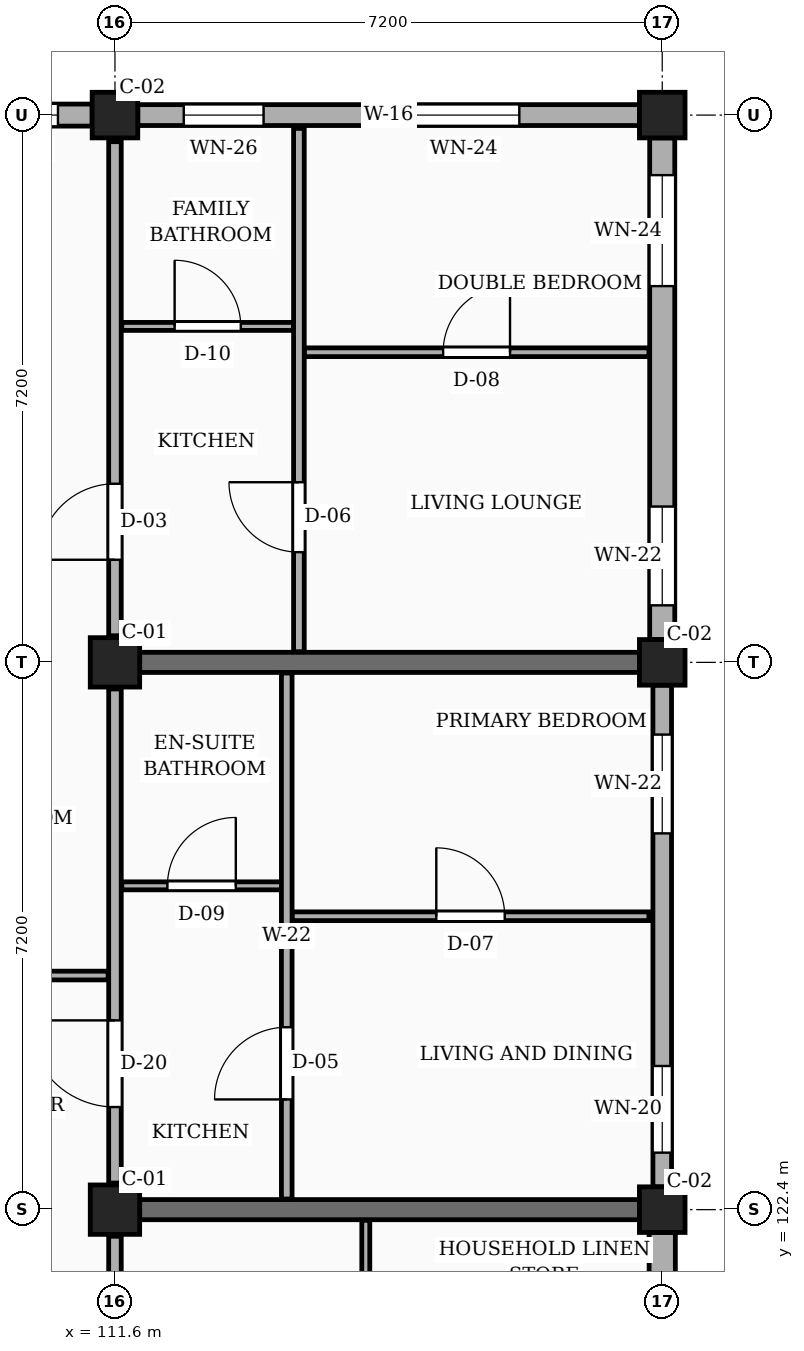
"""IFC4 building model, lengths in metres.
Left out: names, types, materials, properties, quantities, classifications, styles, units other than length and angle.
Written with IfcOpenShell. Run it as: python <this file> out.ifc"""

import sys

from ifc_helpers import new_model, si_unit, direction, frame, frame_2d, origin, origin_2d, place, context, subcontext, project, spatial, rectangle, extrude, element, fill, save


model = new_model("IFC4")
c1 = context("Model", 3, precision=1e-05, world=origin(), true_north=direction((0.0, 1.0)))
c2 = subcontext(c1, "Body", "Model", "MODEL_VIEW")
j1 = project(units=[si_unit("LENGTHUNIT", "METRE"), si_unit("PLANEANGLEUNIT", "RADIAN")], contexts=[c1])
p1 = place(None, origin())
s1 = spatial("IfcSite", under=j1, at=p1, CompositionType="ELEMENT")
p2 = place(p1, origin())
s2 = spatial("IfcBuilding", under=s1, at=p2, CompositionType="ELEMENT")
p3 = place(p2, frame((0.0, 0.0, 4.5)))
s3 = spatial("IfcBuildingStorey", under=s2, at=p3, CompositionType="ELEMENT", Elevation=4.5)
for number, where, z_axis, x_axis in (
    (1, (111.6, 122.4, 0.0), (0.0, 0.0, 1.0), (1.0, 0.0, 0.0)),
    (2, (111.6, 129.6, 0.0), (0.0, 0.0, 1.0), (1.0, 0.0, 0.0)),
):
    element("IfcColumn", number, at=place(p3, frame(where, z_axis=z_axis, x_axis=x_axis)), inside=s3, PredefinedType="COLUMN", context=c2, shape_type="SweptSolid", body=[
        extrude(rectangle(XDim=0.65, YDim=0.65, at=origin_2d()), origin(), (0.0, 0.0, 1.0), 3.15),
    ])
for number, where, z_axis, x_axis in (
    (3, (111.6, 136.8, 0.0), (0.0, 0.0, 1.0), (1.0, 0.0, 0.0)),
    (4, (118.8, 122.4, 0.0), (0.0, 0.0, 1.0), (1.0, 0.0, 0.0)),
    (5, (118.8, 129.6, 0.0), (0.0, 0.0, 1.0), (1.0, 0.0, 0.0)),
    (6, (118.8, 136.8, 0.0), (0.0, 0.0, 1.0), (1.0, 0.0, 0.0)),
):
    element("IfcColumn", number, at=place(p3, frame(where, z_axis=z_axis, x_axis=x_axis)), inside=s3, PredefinedType="COLUMN", context=c2, shape_type="SweptSolid", body=[
        extrude(rectangle(XDim=0.6, YDim=0.6, at=origin_2d()), origin(), (0.0, 0.0, 1.0), 3.15),
    ])
for number, where, z_axis, x_axis in (
    (7, (111.925, 122.4, 0.0), (0.0, 0.0, 1.0), (1.0, 0.0, 0.0)),
    (8, (111.925, 129.6, 0.0), (0.0, 0.0, 1.0), (1.0, 0.0, 0.0)),
):
    element("IfcWall", number, at=place(p3, frame(where, z_axis=z_axis, x_axis=x_axis)), inside=s3, PredefinedType="SOLIDWALL", context=c2, shape_type="SweptSolid", body=[
        extrude(rectangle(XDim=6.575, YDim=0.265, at=frame_2d((3.288, 0.0))), origin(), (0.0, 0.0, 1.0), 2.19),
    ])
p4 = place(p3, frame((118.8, 115.5, 0.0), z_axis=(0.0, 0.0, 1.0), x_axis=(0.0, 1.0, 0.0)))
e9 = element("IfcWall", 9, at=p4, inside=s3, PredefinedType="SOLIDWALL", context=c2, shape_type="SweptSolid", body=[
    extrude(rectangle(XDim=6.6, YDim=0.345, at=frame_2d((3.3, 0.0))), origin(), (0.0, 0.0, 1.0), 2.46),
])
p5 = place(p4, frame((0.45, 0.0, 0.78)))
e10 = element("IfcOpeningElement", 10, at=p5, cuts=e9, PredefinedType="OPENING", context=c2, shape_type="SweptSolid", body=[
    extrude(rectangle(XDim=0.98, YDim=1.36, at=frame_2d((0.49, 0.68))), frame((0.0, 0.183, 0.0), z_axis=(0.0, -1.0, 0.0), x_axis=(1.0, 0.0, 0.0)), (0.0, 0.0, 1.0), 0.365),
])
p6 = place(p4, frame((4.65, 0.0, 0.78)))
e11 = element("IfcOpeningElement", 11, at=p6, cuts=e9, PredefinedType="OPENING", context=c2, shape_type="SweptSolid", body=[
    extrude(rectangle(XDim=1.14, YDim=1.36, at=frame_2d((0.57, 0.68))), frame((0.0, 0.183, 0.0), z_axis=(0.0, -1.0, 0.0), x_axis=(1.0, 0.0, 0.0)), (0.0, 0.0, 1.0), 0.365),
])
p7 = place(p3, frame((118.8, 122.7, 0.0), z_axis=(0.0, 0.0, 1.0), x_axis=(0.0, 1.0, 0.0)))
e12 = element("IfcWall", 12, at=p7, inside=s3, PredefinedType="SOLIDWALL", context=c2, shape_type="SweptSolid", body=[
    extrude(rectangle(XDim=6.6, YDim=0.245, at=frame_2d((3.3, 0.0))), origin(), (0.0, 0.0, 1.0), 2.46),
])
p8 = place(p7, frame((0.45, 0.0, 0.78)))
e13 = element("IfcOpeningElement", 13, at=p8, cuts=e12, PredefinedType="OPENING", context=c2, shape_type="SweptSolid", body=[
    extrude(rectangle(XDim=1.14, YDim=1.36, at=frame_2d((0.57, 0.68))), frame((0.0, 0.133, 0.0), z_axis=(0.0, -1.0, 0.0), x_axis=(1.0, 0.0, 0.0)), (0.0, 0.0, 1.0), 0.265),
])
p9 = place(p7, frame((4.65, 0.0, 0.78)))
e14 = element("IfcOpeningElement", 14, at=p9, cuts=e12, PredefinedType="OPENING", context=c2, shape_type="SweptSolid", body=[
    extrude(rectangle(XDim=1.3, YDim=1.36, at=frame_2d((0.65, 0.68))), frame((0.0, 0.133, 0.0), z_axis=(0.0, -1.0, 0.0), x_axis=(1.0, 0.0, 0.0)), (0.0, 0.0, 1.0), 0.265),
])
p10 = place(p3, frame((118.8, 129.9, 0.0), z_axis=(0.0, 0.0, 1.0), x_axis=(0.0, 1.0, 0.0)))
e15 = element("IfcWall", 15, at=p10, inside=s3, PredefinedType="SOLIDWALL", context=c2, shape_type="SweptSolid", body=[
    extrude(rectangle(XDim=6.6, YDim=0.33, at=frame_2d((3.3, 0.0))), origin(), (0.0, 0.0, 1.0), 2.46),
])
p11 = place(p10, frame((0.45, 0.0, 0.78)))
e16 = element("IfcOpeningElement", 16, at=p11, cuts=e15, PredefinedType="OPENING", context=c2, shape_type="SweptSolid", body=[
    extrude(rectangle(XDim=1.3, YDim=1.36, at=frame_2d((0.65, 0.68))), frame((0.0, 0.175, 0.0), z_axis=(0.0, -1.0, 0.0), x_axis=(1.0, 0.0, 0.0)), (0.0, 0.0, 1.0), 0.35),
])
p12 = place(p10, frame((4.65, 0.0, 0.78)))
e17 = element("IfcOpeningElement", 17, at=p12, cuts=e15, PredefinedType="OPENING", context=c2, shape_type="SweptSolid", body=[
    extrude(rectangle(XDim=1.46, YDim=1.36, at=frame_2d((0.73, 0.68))), frame((0.0, 0.175, 0.0), z_axis=(0.0, -1.0, 0.0), x_axis=(1.0, 0.0, 0.0)), (0.0, 0.0, 1.0), 0.35),
])
p13 = place(p3, frame((118.5, 136.8, 0.0), z_axis=(0.0, 0.0, 1.0), x_axis=(-1.0, 0.0, 0.0)))
e18 = element("IfcWall", 18, at=p13, inside=s3, PredefinedType="SOLIDWALL", context=c2, shape_type="SweptSolid", body=[
    extrude(rectangle(XDim=6.6, YDim=0.275, at=frame_2d((3.3, 0.0))), origin(), (0.0, 0.0, 1.0), 2.46),
])
p14 = place(p13, frame((1.58, 0.0, 0.78)))
e19 = element("IfcOpeningElement", 19, at=p14, cuts=e18, PredefinedType="OPENING", context=c2, shape_type="SweptSolid", body=[
    extrude(rectangle(XDim=1.46, YDim=1.36, at=frame_2d((0.73, 0.68))), frame((0.0, 0.147, 0.0), z_axis=(0.0, -1.0, 0.0), x_axis=(1.0, 0.0, 0.0)), (0.0, 0.0, 1.0), 0.295),
])
p15 = place(p13, frame((4.945, 0.0, 0.78)))
e20 = element("IfcOpeningElement", 20, at=p15, cuts=e18, PredefinedType="OPENING", context=c2, shape_type="SweptSolid", body=[
    extrude(rectangle(XDim=1.05, YDim=1.44, at=frame_2d((0.525, 0.72))), frame((0.0, 0.147, 0.0), z_axis=(0.0, -1.0, 0.0), x_axis=(1.0, 0.0, 0.0)), (0.0, 0.0, 1.0), 0.295),
])
p16 = place(p3, frame((111.3, 136.8, 0.0), z_axis=(0.0, 0.0, 1.0), x_axis=(-1.0, 0.0, 0.0)))
e21 = element("IfcWall", 21, at=p16, inside=s3, PredefinedType="SOLIDWALL", context=c2, shape_type="SweptSolid", body=[
    extrude(rectangle(XDim=6.6, YDim=0.29, at=frame_2d((3.3, 0.0))), origin(), (0.0, 0.0, 1.0), 2.46),
])
p17 = place(p16, frame((0.45, 0.0, 0.78)))
e22 = element("IfcOpeningElement", 22, at=p17, cuts=e21, PredefinedType="OPENING", context=c2, shape_type="SweptSolid", body=[
    extrude(rectangle(XDim=1.05, YDim=1.44, at=frame_2d((0.525, 0.72))), frame((0.0, 0.155, 0.0), z_axis=(0.0, -1.0, 0.0), x_axis=(1.0, 0.0, 0.0)), (0.0, 0.0, 1.0), 0.31),
])
p18 = place(p16, frame((4.65, 0.0, 0.78)))
e23 = element("IfcOpeningElement", 23, at=p18, cuts=e21, PredefinedType="OPENING", context=c2, shape_type="SweptSolid", body=[
    extrude(rectangle(XDim=1.25, YDim=1.44, at=frame_2d((0.625, 0.72))), frame((0.0, 0.155, 0.0), z_axis=(0.0, -1.0, 0.0), x_axis=(1.0, 0.0, 0.0)), (0.0, 0.0, 1.0), 0.31),
])
p19 = place(p3, frame((111.6, 115.55, 0.0), z_axis=(0.0, 0.0, 1.0), x_axis=(0.0, 1.0, 0.0)))
e24 = element("IfcWall", 24, at=p19, inside=s3, PredefinedType="PARTITIONING", context=c2, shape_type="SweptSolid", body=[
    extrude(rectangle(XDim=6.5, YDim=0.165, at=frame_2d((3.25, 0.0))), origin(), (0.0, 0.0, 1.0), 2.24),
])
p20 = place(p19, frame((1.1, 0.0, 0.0)))
e25 = element("IfcOpeningElement", 25, at=p20, cuts=e24, PredefinedType="OPENING", context=c2, shape_type="SweptSolid", body=[
    extrude(rectangle(XDim=0.94, YDim=2.12, at=frame_2d((0.47, 1.06))), frame((0.0, 0.093, 0.0), z_axis=(0.0, -1.0, 0.0), x_axis=(1.0, 0.0, 0.0)), (0.0, 0.0, 1.0), 0.185),
])
p21 = place(p3, frame((111.6, 122.75, 0.0), z_axis=(0.0, 0.0, 1.0), x_axis=(0.0, 1.0, 0.0)))
e26 = element("IfcWall", 26, at=p21, inside=s3, PredefinedType="PARTITIONING", context=c2, shape_type="SweptSolid", body=[
    extrude(rectangle(XDim=6.5, YDim=0.165, at=frame_2d((3.25, 0.0))), origin(), (0.0, 0.0, 1.0), 2.24),
])
p22 = place(p21, frame((1.0, 0.0, 0.0)))
e27 = element("IfcOpeningElement", 27, at=p22, cuts=e26, PredefinedType="OPENING", context=c2, shape_type="SweptSolid", body=[
    extrude(rectangle(XDim=1.14, YDim=2.18, at=frame_2d((0.57, 1.09))), frame((0.0, 0.093, 0.0), z_axis=(0.0, -1.0, 0.0), x_axis=(1.0, 0.0, 0.0)), (0.0, 0.0, 1.0), 0.185),
])
p23 = place(p3, frame((111.6, 129.95, 0.0), z_axis=(0.0, 0.0, 1.0), x_axis=(0.0, 1.0, 0.0)))
e28 = element("IfcWall", 28, at=p23, inside=s3, PredefinedType="PARTITIONING", context=c2, shape_type="SweptSolid", body=[
    extrude(rectangle(XDim=6.5, YDim=0.165, at=frame_2d((3.25, 0.0))), origin(), (0.0, 0.0, 1.0), 2.24),
])
p24 = place(p23, frame((1.0, 0.0, 0.0)))
e29 = element("IfcOpeningElement", 29, at=p24, cuts=e28, PredefinedType="OPENING", context=c2, shape_type="SweptSolid", body=[
    extrude(rectangle(XDim=1.0, YDim=2.15, at=frame_2d((0.5, 1.075))), frame((0.0, 0.093, 0.0), z_axis=(0.0, -1.0, 0.0), x_axis=(1.0, 0.0, 0.0)), (0.0, 0.0, 1.0), 0.185),
])
p25 = place(p3, frame((114.9, 119.07, 0.0), z_axis=(0.0, 0.0, 1.0), x_axis=(0.0, 1.0, 0.0)))
e30 = element("IfcWall", 30, at=p25, inside=s3, PredefinedType="PARTITIONING", context=c2, shape_type="SweptSolid", body=[
    extrude(rectangle(XDim=3.19, YDim=0.105, at=frame_2d((1.595, 0.0))), origin(), (0.0, 0.0, 1.0), 2.325),
])
p26 = place(p3, frame((104.49, 125.48, 0.0), z_axis=(0.0, 0.0, 1.0), x_axis=(1.0, 0.0, 0.0)))
e31 = element("IfcWall", 31, at=p26, inside=s3, PredefinedType="PARTITIONING", context=c2, shape_type="SweptSolid", body=[
    extrude(rectangle(XDim=7.02, YDim=0.115, at=frame_2d((3.51, 0.0))), origin(), (0.0, 0.0, 1.0), 2.325),
])
p27 = place(p26, frame((2.85, 0.0, 0.0)))
e32 = element("IfcOpeningElement", 32, at=p27, cuts=e31, PredefinedType="OPENING", context=c2, shape_type="SweptSolid", body=[
    extrude(rectangle(XDim=1.02, YDim=2.15, at=frame_2d((0.51, 1.075))), frame((0.0, 0.067, 0.0), z_axis=(0.0, -1.0, 0.0), x_axis=(1.0, 0.0, 0.0)), (0.0, 0.0, 1.0), 0.135),
])
p28 = place(p3, frame((113.93, 126.26, 0.0), z_axis=(0.0, 0.0, 1.0), x_axis=(1.0, 0.0, 0.0)))
e33 = element("IfcWall", 33, at=p28, inside=s3, PredefinedType="PARTITIONING", context=c2, shape_type="SweptSolid", body=[
    extrude(rectangle(XDim=4.695, YDim=0.115, at=frame_2d((2.348, 0.0))), origin(), (0.0, 0.0, 1.0), 2.325),
])
p29 = place(p28, frame((1.897, 0.0, 0.0)))
e34 = element("IfcOpeningElement", 34, at=p29, cuts=e33, PredefinedType="OPENING", context=c2, shape_type="SweptSolid", body=[
    extrude(rectangle(XDim=0.9, YDim=2.1, at=frame_2d((0.45, 1.05))), frame((0.0, 0.067, 0.0), z_axis=(0.0, -1.0, 0.0), x_axis=(1.0, 0.0, 0.0)), (0.0, 0.0, 1.0), 0.135),
])
p30 = place(p3, frame((111.69, 126.66, 0.0), z_axis=(0.0, 0.0, 1.0), x_axis=(1.0, 0.0, 0.0)))
e35 = element("IfcWall", 35, at=p30, inside=s3, PredefinedType="PARTITIONING", context=c2, shape_type="SweptSolid", body=[
    extrude(rectangle(XDim=2.1, YDim=0.105, at=frame_2d((1.05, 0.0))), origin(), (0.0, 0.0, 1.0), 2.325),
])
p31 = place(p30, frame((0.6, 0.0, 0.0)))
e36 = element("IfcOpeningElement", 36, at=p31, cuts=e35, PredefinedType="OPENING", context=c2, shape_type="SweptSolid", body=[
    extrude(rectangle(XDim=0.9, YDim=2.05, at=frame_2d((0.45, 1.025))), frame((0.0, 0.062, 0.0), z_axis=(0.0, -1.0, 0.0), x_axis=(1.0, 0.0, 0.0)), (0.0, 0.0, 1.0), 0.125),
])
p32 = place(p3, frame((113.86, 122.54, 0.0), z_axis=(0.0, 0.0, 1.0), x_axis=(0.0, 1.0, 0.0)))
e37 = element("IfcWall", 37, at=p32, inside=s3, PredefinedType="PARTITIONING", context=c2, shape_type="SweptSolid", body=[
    extrude(rectangle(XDim=6.92, YDim=0.14, at=frame_2d((3.46, 0.0))), origin(), (0.0, 0.0, 1.0), 2.325),
])
p33 = place(p32, frame((1.31, 0.0, 0.0)))
e38 = element("IfcOpeningElement", 38, at=p33, cuts=e37, PredefinedType="OPENING", context=c2, shape_type="SweptSolid", body=[
    extrude(rectangle(XDim=0.95, YDim=2.1, at=frame_2d((0.475, 1.05))), frame((0.0, 0.08, 0.0), z_axis=(0.0, -1.0, 0.0), x_axis=(1.0, 0.0, 0.0)), (0.0, 0.0, 1.0), 0.16),
])
p34 = place(p3, frame((114.09, 133.68, 0.0), z_axis=(0.0, 0.0, 1.0), x_axis=(1.0, 0.0, 0.0)))
e39 = element("IfcWall", 39, at=p34, inside=s3, PredefinedType="PARTITIONING", context=c2, shape_type="SweptSolid", body=[
    extrude(rectangle(XDim=4.535, YDim=0.115, at=frame_2d((2.268, 0.0))), origin(), (0.0, 0.0, 1.0), 2.325),
])
p35 = place(p34, frame((1.827, 0.0, 0.0)))
e40 = element("IfcOpeningElement", 40, at=p35, cuts=e39, PredefinedType="OPENING", context=c2, shape_type="SweptSolid", body=[
    extrude(rectangle(XDim=0.88, YDim=2.08, at=frame_2d((0.44, 1.04))), frame((0.0, 0.067, 0.0), z_axis=(0.0, -1.0, 0.0), x_axis=(1.0, 0.0, 0.0)), (0.0, 0.0, 1.0), 0.135),
])
p36 = place(p3, frame((111.69, 134.02, 0.0), z_axis=(0.0, 0.0, 1.0), x_axis=(1.0, 0.0, 0.0)))
e41 = element("IfcWall", 41, at=p36, inside=s3, PredefinedType="PARTITIONING", context=c2, shape_type="SweptSolid", body=[
    extrude(rectangle(XDim=2.26, YDim=0.105, at=frame_2d((1.13, 0.0))), origin(), (0.0, 0.0, 1.0), 2.325),
])
p37 = place(p36, frame((0.695, 0.0, 0.0)))
e42 = element("IfcOpeningElement", 42, at=p37, cuts=e41, PredefinedType="OPENING", context=c2, shape_type="SweptSolid", body=[
    extrude(rectangle(XDim=0.87, YDim=2.05, at=frame_2d((0.435, 1.025))), frame((0.0, 0.062, 0.0), z_axis=(0.0, -1.0, 0.0), x_axis=(1.0, 0.0, 0.0)), (0.0, 0.0, 1.0), 0.125),
])
p38 = place(p3, frame((114.02, 129.74, 0.0), z_axis=(0.0, 0.0, 1.0), x_axis=(0.0, 1.0, 0.0)))
e43 = element("IfcWall", 43, at=p38, inside=s3, PredefinedType="PARTITIONING", context=c2, shape_type="SweptSolid", body=[
    extrude(rectangle(XDim=6.885, YDim=0.14, at=frame_2d((3.442, 0.0))), origin(), (0.0, 0.0, 1.0), 2.325),
])
p39 = place(p38, frame((1.31, 0.0, 0.0)))
e44 = element("IfcOpeningElement", 44, at=p39, cuts=e43, PredefinedType="OPENING", context=c2, shape_type="SweptSolid", body=[
    extrude(rectangle(XDim=0.92, YDim=2.1, at=frame_2d((0.46, 1.05))), frame((0.0, 0.08, 0.0), z_axis=(0.0, -1.0, 0.0), x_axis=(1.0, 0.0, 0.0)), (0.0, 0.0, 1.0), 0.16),
])
p40 = place(p8, origin())
e45 = element("IfcWindow", 45, at=p40, inside=s3, PartitioningType="SINGLE_PANEL", PredefinedType="WINDOW", context=c2, shape_type="SweptSolid", body=[
    extrude(rectangle(XDim=1.14, YDim=1.36, at=frame_2d((0.57, 0.68))), frame((0.0, 0.03, 0.0), z_axis=(0.0, -1.0, 0.0), x_axis=(1.0, 0.0, 0.0)), (0.0, 0.0, 1.0), 0.06),
])
fill(e13, e45)
p41 = place(p9, origin())
e46 = element("IfcWindow", 46, at=p41, inside=s3, PartitioningType="SINGLE_PANEL", PredefinedType="WINDOW", context=c2, shape_type="SweptSolid", body=[
    extrude(rectangle(XDim=1.3, YDim=1.36, at=frame_2d((0.65, 0.68))), frame((0.0, 0.03, 0.0), z_axis=(0.0, -1.0, 0.0), x_axis=(1.0, 0.0, 0.0)), (0.0, 0.0, 1.0), 0.06),
])
fill(e14, e46)
p42 = place(p11, origin())
e47 = element("IfcWindow", 47, at=p42, inside=s3, PartitioningType="SINGLE_PANEL", PredefinedType="WINDOW", context=c2, shape_type="SweptSolid", body=[
    extrude(rectangle(XDim=1.3, YDim=1.36, at=frame_2d((0.65, 0.68))), frame((0.0, 0.03, 0.0), z_axis=(0.0, -1.0, 0.0), x_axis=(1.0, 0.0, 0.0)), (0.0, 0.0, 1.0), 0.06),
])
fill(e16, e47)
p43 = place(p12, origin())
e48 = element("IfcWindow", 48, at=p43, inside=s3, PartitioningType="SINGLE_PANEL", PredefinedType="WINDOW", context=c2, shape_type="SweptSolid", body=[
    extrude(rectangle(XDim=1.46, YDim=1.36, at=frame_2d((0.73, 0.68))), frame((0.0, 0.03, 0.0), z_axis=(0.0, -1.0, 0.0), x_axis=(1.0, 0.0, 0.0)), (0.0, 0.0, 1.0), 0.06),
])
fill(e17, e48)
p44 = place(p14, origin())
e49 = element("IfcWindow", 49, at=p44, inside=s3, PartitioningType="SINGLE_PANEL", PredefinedType="WINDOW", context=c2, shape_type="SweptSolid", body=[
    extrude(rectangle(XDim=1.46, YDim=1.36, at=frame_2d((0.73, 0.68))), frame((0.0, 0.03, 0.0), z_axis=(0.0, -1.0, 0.0), x_axis=(1.0, 0.0, 0.0)), (0.0, 0.0, 1.0), 0.06),
])
fill(e19, e49)
p45 = place(p15, origin())
e50 = element("IfcWindow", 50, at=p45, inside=s3, PartitioningType="SINGLE_PANEL", PredefinedType="WINDOW", context=c2, shape_type="SweptSolid", body=[
    extrude(rectangle(XDim=1.05, YDim=1.44, at=frame_2d((0.525, 0.72))), frame((0.0, 0.03, 0.0), z_axis=(0.0, -1.0, 0.0), x_axis=(1.0, 0.0, 0.0)), (0.0, 0.0, 1.0), 0.06),
])
fill(e20, e50)
p46 = place(p17, origin())
e51 = element("IfcWindow", 51, at=p46, inside=s3, PartitioningType="SINGLE_PANEL", PredefinedType="WINDOW", context=c2, shape_type="SweptSolid", body=[
    extrude(rectangle(XDim=1.05, YDim=1.44, at=frame_2d((0.525, 0.72))), frame((0.0, 0.03, 0.0), z_axis=(0.0, -1.0, 0.0), x_axis=(1.0, 0.0, 0.0)), (0.0, 0.0, 1.0), 0.06),
])
fill(e22, e51)
p47 = place(p22, origin())
e52 = element("IfcDoor", 52, at=p47, inside=s3, OperationType="SINGLE_SWING_RIGHT", PredefinedType="DOOR", context=c2, shape_type="SweptSolid", body=[
    extrude(rectangle(XDim=1.14, YDim=2.18, at=frame_2d((0.57, 1.09))), frame((0.0, 0.025, 0.0), z_axis=(0.0, -1.0, 0.0), x_axis=(1.0, 0.0, 0.0)), (0.0, 0.0, 1.0), 0.05),
])
fill(e27, e52)
p48 = place(p24, origin())
e53 = element("IfcDoor", 53, at=p48, inside=s3, OperationType="SINGLE_SWING_LEFT", PredefinedType="DOOR", context=c2, shape_type="SweptSolid", body=[
    extrude(rectangle(XDim=1.0, YDim=2.15, at=frame_2d((0.5, 1.075))), frame((0.0, 0.025, 0.0), z_axis=(0.0, -1.0, 0.0), x_axis=(1.0, 0.0, 0.0)), (0.0, 0.0, 1.0), 0.05),
])
fill(e29, e53)
p49 = place(p29, origin())
e54 = element("IfcDoor", 54, at=p49, inside=s3, OperationType="SINGLE_SWING_LEFT", PredefinedType="DOOR", context=c2, shape_type="SweptSolid", body=[
    extrude(rectangle(XDim=0.9, YDim=2.1, at=frame_2d((0.45, 1.05))), frame((0.0, 0.025, 0.0), z_axis=(0.0, -1.0, 0.0), x_axis=(1.0, 0.0, 0.0)), (0.0, 0.0, 1.0), 0.05),
])
fill(e34, e54)
p50 = place(p31, origin())
e55 = element("IfcDoor", 55, at=p50, inside=s3, OperationType="SINGLE_SWING_RIGHT", PredefinedType="DOOR", context=c2, shape_type="SweptSolid", body=[
    extrude(rectangle(XDim=0.9, YDim=2.05, at=frame_2d((0.45, 1.025))), frame((0.0, 0.025, 0.0), z_axis=(0.0, -1.0, 0.0), x_axis=(1.0, 0.0, 0.0)), (0.0, 0.0, 1.0), 0.05),
])
fill(e36, e55)
p51 = place(p33, origin())
e56 = element("IfcDoor", 56, at=p51, inside=s3, OperationType="SINGLE_SWING_LEFT", PredefinedType="DOOR", context=c2, shape_type="SweptSolid", body=[
    extrude(rectangle(XDim=0.95, YDim=2.1, at=frame_2d((0.475, 1.05))), frame((0.0, 0.025, 0.0), z_axis=(0.0, -1.0, 0.0), x_axis=(1.0, 0.0, 0.0)), (0.0, 0.0, 1.0), 0.05),
])
fill(e38, e56)
p52 = place(p35, origin())
e57 = element("IfcDoor", 57, at=p52, inside=s3, OperationType="SINGLE_SWING_RIGHT", PredefinedType="DOOR", context=c2, shape_type="SweptSolid", body=[
    extrude(rectangle(XDim=0.88, YDim=2.08, at=frame_2d((0.44, 1.04))), frame((0.0, 0.025, 0.0), z_axis=(0.0, -1.0, 0.0), x_axis=(1.0, 0.0, 0.0)), (0.0, 0.0, 1.0), 0.05),
])
fill(e40, e57)
p53 = place(p37, origin())
e58 = element("IfcDoor", 58, at=p53, inside=s3, OperationType="SINGLE_SWING_LEFT", PredefinedType="DOOR", context=c2, shape_type="SweptSolid", body=[
    extrude(rectangle(XDim=0.87, YDim=2.05, at=frame_2d((0.435, 1.025))), frame((0.0, 0.025, 0.0), z_axis=(0.0, -1.0, 0.0), x_axis=(1.0, 0.0, 0.0)), (0.0, 0.0, 1.0), 0.05),
])
fill(e42, e58)
p54 = place(p39, origin())
e59 = element("IfcDoor", 59, at=p54, inside=s3, OperationType="SINGLE_SWING_RIGHT", PredefinedType="DOOR", context=c2, shape_type="SweptSolid", body=[
    extrude(rectangle(XDim=0.92, YDim=2.1, at=frame_2d((0.46, 1.05))), frame((0.0, 0.025, 0.0), z_axis=(0.0, -1.0, 0.0), x_axis=(1.0, 0.0, 0.0)), (0.0, 0.0, 1.0), 0.05),
])
fill(e44, e59)
save(model, sys.argv[1])
